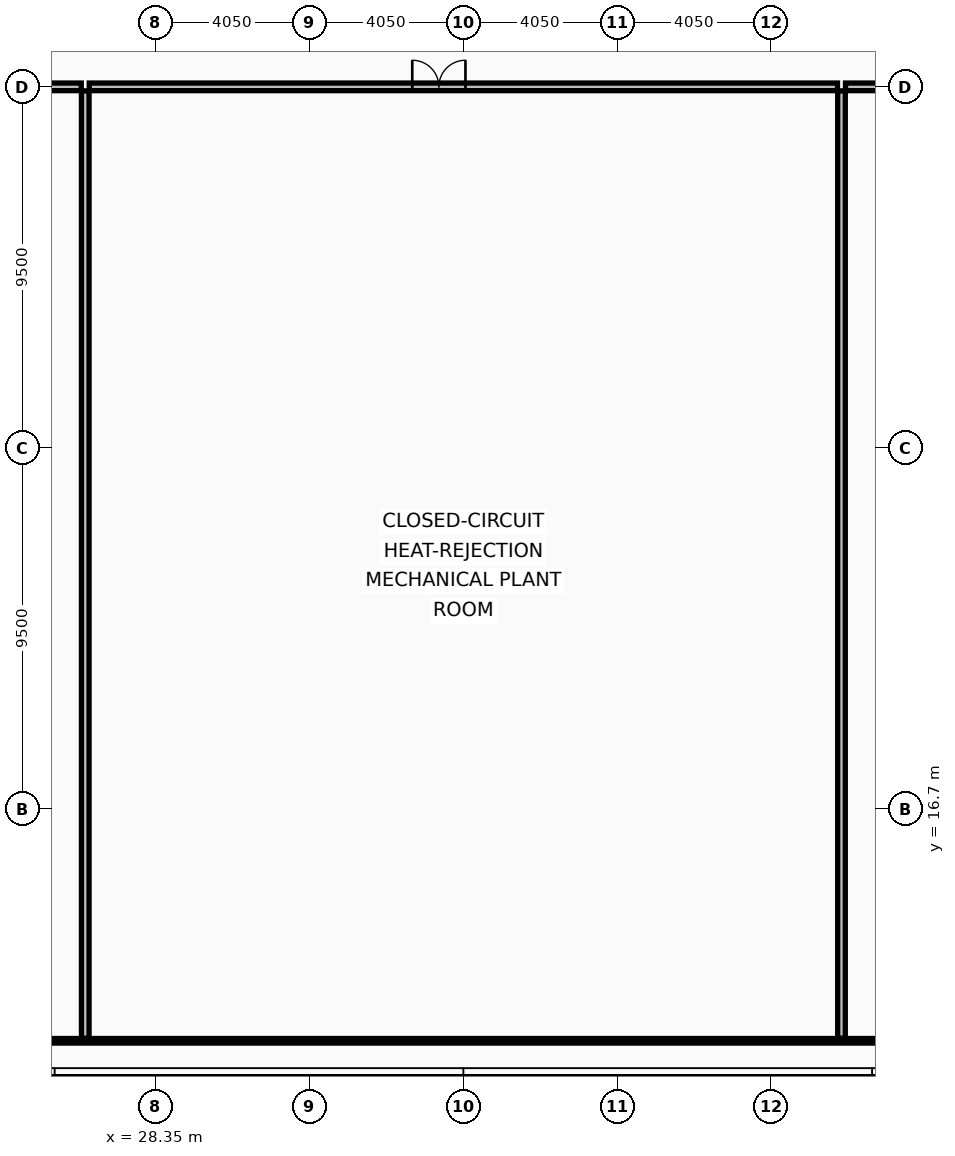
"""IFC4 building model, lengths in metres.
Left out: names, types, materials, properties, quantities, classifications, styles, units other than length and angle.
Written with IfcOpenShell. Run it as: python <this file> out.ifc"""

import sys

from ifc_helpers import new_model, si_unit, direction, frame, frame_2d, origin, place, context, subcontext, project, spatial, rectangle, extrude, element, fill, save


model = new_model("IFC4")
c1 = context("Model", 3, precision=1e-05, world=origin(), true_north=direction((0.0, 1.0)))
c2 = subcontext(c1, "Body", "Model", "MODEL_VIEW")
j1 = project(units=[si_unit("LENGTHUNIT", "METRE"), si_unit("PLANEANGLEUNIT", "RADIAN")], contexts=[c1])
p1 = place(None, origin())
s1 = spatial("IfcSite", under=j1, at=p1, CompositionType="ELEMENT")
p2 = place(p1, origin())
s2 = spatial("IfcBuilding", under=s1, at=p2, CompositionType="ELEMENT")
p3 = place(p2, frame((0.0, 0.0, 361.8)))
s3 = spatial("IfcBuildingStorey", under=s2, at=p3, CompositionType="ELEMENT", Elevation=361.8)
p4 = place(p3, frame((12.095, 35.7, 0.0), z_axis=(0.0, 0.0, 1.0), x_axis=(1.0, 0.0, 0.0)))
e1 = element("IfcWall", 1, at=p4, inside=s3, PredefinedType="PARTITIONING", context=c2, shape_type="SweptSolid", body=[
    extrude(rectangle(XDim=14.3, YDim=0.2, at=frame_2d((7.15, 0.0))), origin(), (0.0, 0.0, 1.0), 4.79),
])
p5 = place(p4, frame((6.65, 0.0, 0.0)))
e2 = element("IfcOpeningElement", 2, at=p5, cuts=e1, PredefinedType="OPENING", context=c2, shape_type="SweptSolid", body=[
    extrude(rectangle(XDim=1.4, YDim=2.15, at=frame_2d((0.7, 1.075))), frame((0.0, 0.11, 0.0), z_axis=(0.0, -1.0, 0.0), x_axis=(1.0, 0.0, 0.0)), (0.0, 0.0, 1.0), 0.22),
])
p6 = place(p3, frame((26.605, 35.7, 0.0), z_axis=(0.0, 0.0, 1.0), x_axis=(1.0, 0.0, 0.0)))
e3 = element("IfcWall", 3, at=p6, inside=s3, PredefinedType="PARTITIONING", context=c2, shape_type="SweptSolid", body=[
    extrude(rectangle(XDim=19.69, YDim=0.2, at=frame_2d((9.845, 0.0))), origin(), (0.0, 0.0, 1.0), 5.03),
])
p7 = place(p6, frame((8.5, 0.0, 0.0)))
e4 = element("IfcOpeningElement", 4, at=p7, cuts=e3, PredefinedType="OPENING", context=c2, shape_type="SweptSolid", body=[
    extrude(rectangle(XDim=1.4, YDim=2.15, at=frame_2d((0.7, 1.075))), frame((0.0, 0.11, 0.0), z_axis=(0.0, -1.0, 0.0), x_axis=(1.0, 0.0, 0.0)), (0.0, 0.0, 1.0), 0.22),
])
p8 = place(p3, frame((46.505, 35.7, 0.0), z_axis=(0.0, 0.0, 1.0), x_axis=(1.0, 0.0, 0.0)))
e5 = element("IfcWall", 5, at=p8, inside=s3, PredefinedType="PARTITIONING", context=c2, shape_type="SweptSolid", body=[
    extrude(rectangle(XDim=14.3, YDim=0.2, at=frame_2d((7.15, 0.0))), origin(), (0.0, 0.0, 1.0), 4.79),
])
p9 = place(p8, frame((5.5, 0.0, 0.0)))
e6 = element("IfcOpeningElement", 6, at=p9, cuts=e5, PredefinedType="OPENING", context=c2, shape_type="SweptSolid", body=[
    extrude(rectangle(XDim=1.4, YDim=2.15, at=frame_2d((0.7, 1.075))), frame((0.0, 0.11, 0.0), z_axis=(0.0, -1.0, 0.0), x_axis=(1.0, 0.0, 0.0)), (0.0, 0.0, 1.0), 0.22),
])
for number, where, z_axis, x_axis in (
    (7, (26.5, 10.665, 0.0), (0.0, 0.0, 1.0), (0.0, 1.0, 0.0)),
    (8, (46.4, 10.665, 0.0), (0.0, 0.0, 1.0), (0.0, 1.0, 0.0)),
):
    element("IfcWall", number, at=place(p3, frame(where, z_axis=z_axis, x_axis=x_axis)), inside=s3, PredefinedType="PARTITIONING", context=c2, shape_type="SweptSolid", body=[
        extrude(rectangle(XDim=24.93, YDim=0.2, at=frame_2d((12.465, 0.0))), origin(), (0.0, 0.0, 1.0), 5.03),
    ])
p10 = place(p3, frame((12.095, 10.6, 0.0), z_axis=(0.0, 0.0, 1.0), x_axis=(1.0, 0.0, 0.0)))
e9 = element("IfcWall", 9, at=p10, inside=s3, PredefinedType="PARTITIONING", context=c2, shape_type="SweptSolid", body=[
    extrude(rectangle(XDim=48.71, YDim=0.12, at=frame_2d((24.355, 0.0))), origin(), (0.0, 0.0, 1.0), 4.79),
])
p11 = place(p7, origin())
e10 = element("IfcDoor", 10, at=p11, inside=s3, OperationType="DOUBLE_DOOR_SINGLE_SWING", PredefinedType="DOOR", context=c2, shape_type="SweptSolid", body=[
    extrude(rectangle(XDim=1.4, YDim=2.15, at=frame_2d((0.7, 1.075))), frame((0.0, 0.025, 0.0), z_axis=(0.0, -1.0, 0.0), x_axis=(1.0, 0.0, 0.0)), (0.0, 0.0, 1.0), 0.05),
])
fill(e4, e10)
save(model, sys.argv[1])
